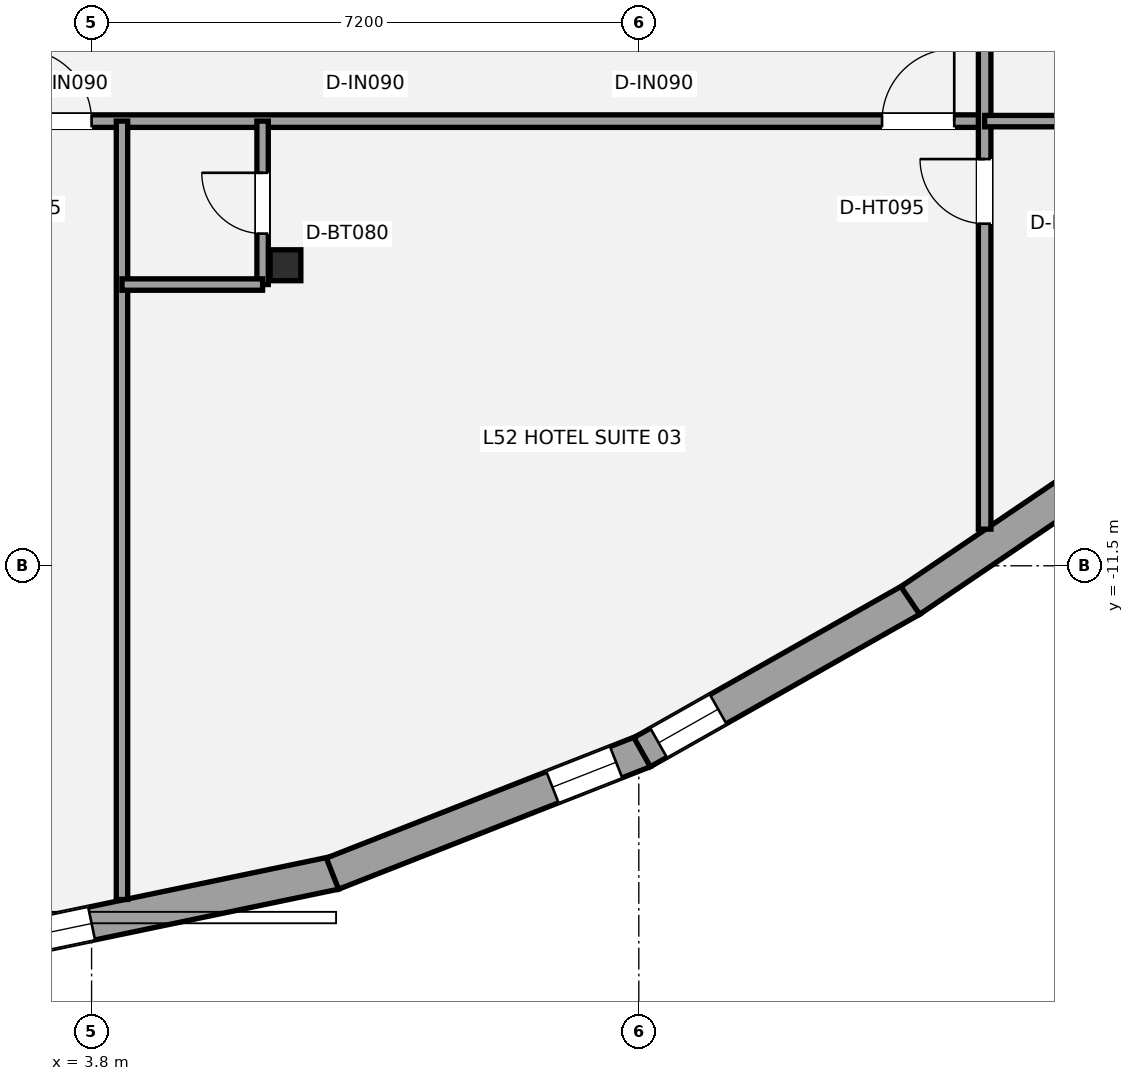
"""IFC4 building model, lengths in metres.
Left out: names, types, materials, properties, quantities, classifications, styles, units other than length and angle.
Written with IfcOpenShell. Run it as: python <this file> out.ifc"""

import sys

from ifc_helpers import new_model, si_unit, direction, frame, frame_2d, origin, origin_2d, place, context, subcontext, project, spatial, rectangle, i_section, extrude, element, fill, save


model = new_model("IFC4")
c1 = context("Model", 3, precision=1e-05, world=origin(), true_north=direction((0.0, 1.0)))
c2 = subcontext(c1, "Body", "Model", "MODEL_VIEW")
j1 = project(units=[si_unit("LENGTHUNIT", "METRE"), si_unit("PLANEANGLEUNIT", "RADIAN")], contexts=[c1])
p1 = place(None, origin())
s1 = spatial("IfcSite", under=j1, at=p1, CompositionType="ELEMENT")
p2 = place(p1, origin())
s2 = spatial("IfcBuilding", under=s1, at=p2, CompositionType="ELEMENT")
p3 = place(p2, frame((0.0, 0.0, 188.6)))
s3 = spatial("IfcBuildingStorey", under=s2, at=p3, CompositionType="ELEMENT", Elevation=188.6)
p4 = place(p3, frame((6.351, -7.546, 0.0), z_axis=(0.0, 0.0, 1.0), x_axis=(1.0, 0.0, 0.0)))
e1 = element("IfcColumn", 1, at=p4, inside=s3, PredefinedType="COLUMN", context=c2, shape_type="SweptSolid", body=[
    extrude(i_section(OverallWidth=0.404, OverallDepth=0.407, WebThickness=0.027, FlangeThickness=0.044, at=origin_2d()), origin(), (0.0, 0.0, 1.0), 3.2),
])
p5 = place(p3, frame((7.005, -15.539, 0.0), z_axis=(0.0, 0.0, 1.0), x_axis=(-0.979004509935, -0.203838586943, 0.0)))
e2 = element("IfcWall", 2, at=p5, inside=s3, PredefinedType="STANDARD", context=c2, shape_type="SweptSolid", body=[
    extrude(rectangle(XDim=4.72, YDim=0.44, at=frame_2d((2.36, 0.0))), origin(), (0.0, 0.0, 1.0), 2.315),
])
p6 = place(p5, frame((3.273, 0.0, 0.58)))
e3 = element("IfcOpeningElement", 3, at=p6, cuts=e2, PredefinedType="OPENING", context=c2, shape_type="SweptSolid", body=[
    extrude(rectangle(XDim=0.9, YDim=1.35, at=frame_2d((0.45, 0.675))), frame((0.0, 0.23, 0.0), z_axis=(0.0, -1.0, 0.0), x_axis=(1.0, 0.0, 0.0)), (0.0, 0.0, 1.0), 0.46),
])
p7 = place(p3, frame((11.071, -13.939, 0.0), z_axis=(0.0, 0.0, 1.0), x_axis=(-0.930777752543, -0.365585524018, 0.0)))
e4 = element("IfcWall", 4, at=p7, inside=s3, PredefinedType="STANDARD", context=c2, shape_type="SweptSolid", body=[
    extrude(rectangle(XDim=4.407, YDim=0.44, at=frame_2d((2.203, 0.0))), origin(), (0.0, 0.0, 1.0), 2.315),
])
p8 = place(p7, frame((0.397, 0.0, 0.58)))
e5 = element("IfcOpeningElement", 5, at=p8, cuts=e4, PredefinedType="OPENING", context=c2, shape_type="SweptSolid", body=[
    extrude(rectangle(XDim=0.9, YDim=1.35, at=frame_2d((0.45, 0.675))), frame((0.0, 0.23, 0.0), z_axis=(0.0, -1.0, 0.0), x_axis=(1.0, 0.0, 0.0)), (0.0, 0.0, 1.0), 0.46),
])
p9 = place(p3, frame((14.587, -11.948, 0.0), z_axis=(0.0, 0.0, 1.0), x_axis=(-0.870346086449, -0.492440544434, 0.0)))
e6 = element("IfcWall", 6, at=p9, inside=s3, PredefinedType="STANDARD", context=c2, shape_type="SweptSolid", body=[
    extrude(rectangle(XDim=4.071, YDim=0.44, at=frame_2d((2.036, 0.0))), origin(), (0.0, 0.0, 1.0), 2.315),
])
p10 = place(p9, frame((2.922, 0.0, 0.58)))
e7 = element("IfcOpeningElement", 7, at=p10, cuts=e6, PredefinedType="OPENING", context=c2, shape_type="SweptSolid", body=[
    extrude(rectangle(XDim=0.9, YDim=1.35, at=frame_2d((0.45, 0.675))), frame((0.0, 0.23, 0.0), z_axis=(0.0, -1.0, 0.0), x_axis=(1.0, 0.0, 0.0)), (0.0, 0.0, 1.0), 0.46),
])
p11 = place(p3, frame((17.782, -9.78, 0.0), z_axis=(0.0, 0.0, 1.0), x_axis=(-0.82772633423, -0.56113199483, 0.0)))
e8 = element("IfcWall", 8, at=p11, inside=s3, PredefinedType="STANDARD", context=c2, shape_type="SweptSolid", body=[
    extrude(rectangle(XDim=3.879, YDim=0.44, at=frame_2d((1.939, 0.0))), origin(), (0.0, 0.0, 1.0), 2.315),
])
p12 = place(p11, frame((0.2, 0.0, 0.58)))
e9 = element("IfcOpeningElement", 9, at=p12, cuts=e8, PredefinedType="OPENING", context=c2, shape_type="SweptSolid", body=[
    extrude(rectangle(XDim=0.9, YDim=1.35, at=frame_2d((0.45, 0.675))), frame((0.0, 0.23, 0.0), z_axis=(0.0, -1.0, 0.0), x_axis=(1.0, 0.0, 0.0)), (0.0, 0.0, 1.0), 0.46),
])
p13 = place(p3, frame((-16.1, -5.65, 0.0), z_axis=(0.0, 0.0, 1.0), x_axis=(1.0, 0.0, 0.0)))
e10 = element("IfcWall", 10, at=p13, inside=s3, PredefinedType="PARTITIONING", context=c2, shape_type="SweptSolid", body=[
    extrude(rectangle(XDim=31.65, YDim=0.165, at=frame_2d((15.825, 0.0))), origin(), (0.0, 0.0, 1.0), 2.398),
])
p14 = place(p13, frame((8.95, 0.0, 0.0)))
e11 = element("IfcOpeningElement", 11, at=p14, cuts=e10, PredefinedType="OPENING", context=c2, shape_type="SweptSolid", body=[
    extrude(rectangle(XDim=0.95, YDim=2.15, at=frame_2d((0.475, 1.075))), frame((0.0, 0.093, 0.0), z_axis=(0.0, -1.0, 0.0), x_axis=(1.0, 0.0, 0.0)), (0.0, 0.0, 1.0), 0.185),
])
p15 = place(p13, frame((18.95, 0.0, 0.0)))
e12 = element("IfcOpeningElement", 12, at=p15, cuts=e10, PredefinedType="OPENING", context=c2, shape_type="SweptSolid", body=[
    extrude(rectangle(XDim=0.95, YDim=2.15, at=frame_2d((0.475, 1.075))), frame((0.0, 0.093, 0.0), z_axis=(0.0, -1.0, 0.0), x_axis=(1.0, 0.0, 0.0)), (0.0, 0.0, 1.0), 0.185),
])
p16 = place(p13, frame((30.3, 0.0, 0.0)))
e13 = element("IfcOpeningElement", 13, at=p16, cuts=e10, PredefinedType="OPENING", context=c2, shape_type="SweptSolid", body=[
    extrude(rectangle(XDim=0.95, YDim=2.15, at=frame_2d((0.475, 1.075))), frame((0.0, 0.093, 0.0), z_axis=(0.0, -1.0, 0.0), x_axis=(1.0, 0.0, 0.0)), (0.0, 0.0, 1.0), 0.185),
])
p17 = place(p3, frame((15.55, -11.018, 0.0), z_axis=(0.0, 0.0, 1.0), x_axis=(0.0, 1.0, 0.0)))
e14 = element("IfcWall", 14, at=p17, inside=s3, PredefinedType="PARTITIONING", context=c2, shape_type="SweptSolid", body=[
    extrude(rectangle(XDim=18.568, YDim=0.165, at=frame_2d((9.284, 0.0))), origin(), (0.0, 0.0, 1.0), 2.473),
])
p18 = place(p17, frame((4.019, 0.0, 0.0)))
e15 = element("IfcOpeningElement", 15, at=p18, cuts=e14, PredefinedType="OPENING", context=c2, shape_type="SweptSolid", body=[
    extrude(rectangle(XDim=0.85, YDim=2.1, at=frame_2d((0.425, 1.05))), frame((0.0, 0.093, 0.0), z_axis=(0.0, -1.0, 0.0), x_axis=(1.0, 0.0, 0.0)), (0.0, 0.0, 1.0), 0.185),
])
p19 = place(p17, frame((8.067, 0.0, 0.0)))
e16 = element("IfcOpeningElement", 16, at=p19, cuts=e14, PredefinedType="OPENING", context=c2, shape_type="SweptSolid", body=[
    extrude(rectangle(XDim=0.95, YDim=2.15, at=frame_2d((0.475, 1.075))), frame((0.0, 0.093, 0.0), z_axis=(0.0, -1.0, 0.0), x_axis=(1.0, 0.0, 0.0)), (0.0, 0.0, 1.0), 0.185),
])
p20 = place(p17, frame((12.468, 0.0, 0.0)))
e17 = element("IfcOpeningElement", 17, at=p20, cuts=e14, PredefinedType="OPENING", context=c2, shape_type="SweptSolid", body=[
    extrude(rectangle(XDim=0.95, YDim=2.15, at=frame_2d((0.475, 1.075))), frame((0.0, 0.093, 0.0), z_axis=(0.0, -1.0, 0.0), x_axis=(1.0, 0.0, 0.0)), (0.0, 0.0, 1.0), 0.185),
])
p21 = place(p17, frame((17.218, 0.0, 0.0)))
e18 = element("IfcOpeningElement", 18, at=p21, cuts=e14, PredefinedType="OPENING", context=c2, shape_type="SweptSolid", body=[
    extrude(rectangle(XDim=0.95, YDim=2.15, at=frame_2d((0.475, 1.075))), frame((0.0, 0.093, 0.0), z_axis=(0.0, -1.0, 0.0), x_axis=(1.0, 0.0, 0.0)), (0.0, 0.0, 1.0), 0.185),
])
p22 = place(p3, frame((15.55, -5.65, 0.0), z_axis=(0.0, 0.0, 1.0), x_axis=(1.0, 0.0, 0.0)))
e19 = element("IfcWall", 19, at=p22, inside=s3, PredefinedType="PLUMBINGWALL", context=c2, shape_type="SweptSolid", body=[
    extrude(rectangle(XDim=6.356, YDim=0.15, at=frame_2d((3.178, 0.0))), origin(), (0.0, 0.0, 1.0), 2.473),
])
p23 = place(p3, frame((4.2, -15.89, 0.0), z_axis=(0.0, 0.0, 1.0), x_axis=(0.0, 1.0, 0.0)))
e20 = element("IfcWall", 20, at=p23, inside=s3, PredefinedType="PLUMBINGWALL", context=c2, shape_type="SweptSolid", body=[
    extrude(rectangle(XDim=10.24, YDim=0.15, at=frame_2d((5.12, 0.0))), origin(), (0.0, 0.0, 1.0), 2.473),
])
p24 = place(p3, frame((6.05, -7.8, 0.0), z_axis=(0.0, 0.0, 1.0), x_axis=(0.0, 1.0, 0.0)))
e21 = element("IfcWall", 21, at=p24, inside=s3, PredefinedType="PLUMBINGWALL", context=c2, shape_type="SweptSolid", body=[
    extrude(rectangle(XDim=2.15, YDim=0.15, at=frame_2d((1.075, 0.0))), origin(), (0.0, 0.0, 1.0), 2.473),
])
p25 = place(p24, frame((0.67, 0.0, 0.0)))
e22 = element("IfcOpeningElement", 22, at=p25, cuts=e21, PredefinedType="OPENING", context=c2, shape_type="SweptSolid", body=[
    extrude(rectangle(XDim=0.8, YDim=2.1, at=frame_2d((0.4, 1.05))), frame((0.0, 0.085, 0.0), z_axis=(0.0, -1.0, 0.0), x_axis=(1.0, 0.0, 0.0)), (0.0, 0.0, 1.0), 0.17),
])
p26 = place(p3, frame((4.2, -7.8, 0.0), z_axis=(0.0, 0.0, 1.0), x_axis=(1.0, 0.0, 0.0)))
e23 = element("IfcWall", 23, at=p26, inside=s3, PredefinedType="PLUMBINGWALL", context=c2, shape_type="SweptSolid", body=[
    extrude(rectangle(XDim=1.85, YDim=0.15, at=frame_2d((0.925, 0.0))), origin(), (0.0, 0.0, 1.0), 3.02),
])
p27 = place(p6, origin())
e24 = element("IfcWindow", 24, at=p27, inside=s3, PartitioningType="SINGLE_PANEL", PredefinedType="WINDOW", context=c2, shape_type="SweptSolid", body=[
    extrude(rectangle(XDim=0.9, YDim=1.35, at=frame_2d((0.45, 0.675))), frame((0.0, -0.01, 0.0), z_axis=(0.0, -1.0, 0.0), x_axis=(1.0, 0.0, 0.0)), (0.0, 0.0, 1.0), 0.06),
])
fill(e3, e24)
p28 = place(p8, origin())
e25 = element("IfcWindow", 25, at=p28, inside=s3, PartitioningType="SINGLE_PANEL", PredefinedType="WINDOW", context=c2, shape_type="SweptSolid", body=[
    extrude(rectangle(XDim=0.9, YDim=1.35, at=frame_2d((0.45, 0.675))), frame((0.0, -0.01, 0.0), z_axis=(0.0, -1.0, 0.0), x_axis=(1.0, 0.0, 0.0)), (0.0, 0.0, 1.0), 0.06),
])
fill(e5, e25)
p29 = place(p10, origin())
e26 = element("IfcWindow", 26, at=p29, inside=s3, PartitioningType="SINGLE_PANEL", PredefinedType="WINDOW", context=c2, shape_type="SweptSolid", body=[
    extrude(rectangle(XDim=0.9, YDim=1.35, at=frame_2d((0.45, 0.675))), frame((0.0, -0.01, 0.0), z_axis=(0.0, -1.0, 0.0), x_axis=(1.0, 0.0, 0.0)), (0.0, 0.0, 1.0), 0.06),
])
fill(e7, e26)
p30 = place(p18, origin())
e27 = element("IfcDoor", 27, at=p30, inside=s3, OperationType="SINGLE_SWING_RIGHT", PredefinedType="DOOR", context=c2, shape_type="SweptSolid", body=[
    extrude(rectangle(XDim=0.85, YDim=2.1, at=frame_2d((0.425, 1.05))), frame((0.0, 0.025, 0.0), z_axis=(0.0, -1.0, 0.0), x_axis=(1.0, 0.0, 0.0)), (0.0, 0.0, 1.0), 0.05),
])
fill(e15, e27)
p31 = place(p15, origin())
e28 = element("IfcDoor", 28, at=p31, inside=s3, OperationType="SINGLE_SWING_LEFT", PredefinedType="DOOR", context=c2, shape_type="SweptSolid", body=[
    extrude(rectangle(XDim=0.95, YDim=2.15, at=frame_2d((0.475, 1.075))), frame((0.0, 0.025, 0.0), z_axis=(0.0, -1.0, 0.0), x_axis=(1.0, 0.0, 0.0)), (0.0, 0.0, 1.0), 0.05),
])
fill(e12, e28)
p32 = place(p16, origin())
e29 = element("IfcDoor", 29, at=p32, inside=s3, OperationType="SINGLE_SWING_RIGHT", PredefinedType="DOOR", context=c2, shape_type="SweptSolid", body=[
    extrude(rectangle(XDim=0.95, YDim=2.15, at=frame_2d((0.475, 1.075))), frame((0.0, 0.025, 0.0), z_axis=(0.0, -1.0, 0.0), x_axis=(1.0, 0.0, 0.0)), (0.0, 0.0, 1.0), 0.05),
])
fill(e13, e29)
p33 = place(p25, origin())
e30 = element("IfcDoor", 30, at=p33, inside=s3, OperationType="SINGLE_SWING_RIGHT", PredefinedType="DOOR", context=c2, shape_type="SweptSolid", body=[
    extrude(rectangle(XDim=0.8, YDim=2.1, at=frame_2d((0.4, 1.05))), frame((0.0, 0.025, 0.0), z_axis=(0.0, -1.0, 0.0), x_axis=(1.0, 0.0, 0.0)), (0.0, 0.0, 1.0), 0.05),
])
fill(e22, e30)
save(model, sys.argv[1])
